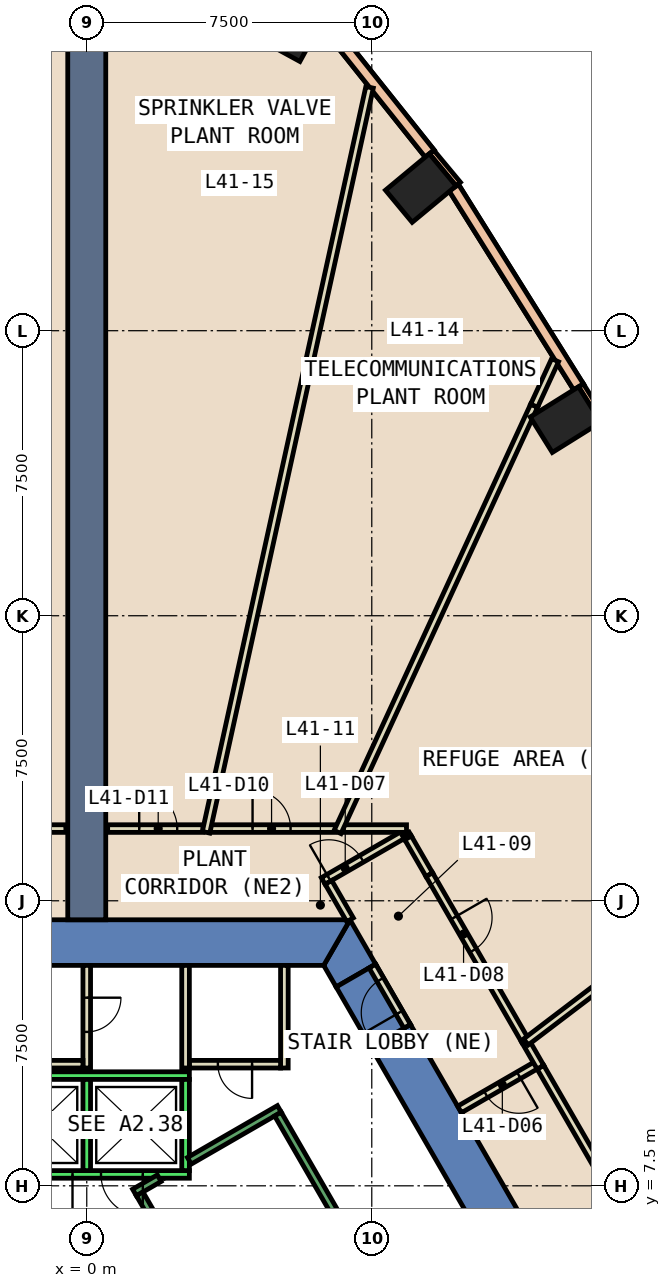
"""IFC4 building model, lengths in metres.
Left out: names, types, materials, properties, quantities, classifications, styles, units other than length and angle.
Written with IfcOpenShell. Run it as: python <this file> out.ifc"""

import sys

from ifc_helpers import new_model, si_unit, direction, frame, frame_2d, origin, origin_2d, place, context, subcontext, project, spatial, polyline, rectangle, outline, extrude, element, fill, save


model = new_model("IFC4")
c1 = context("Model", 3, precision=1e-05, world=origin(), true_north=direction((0.0, 1.0)))
c2 = subcontext(c1, "Body", "Model", "MODEL_VIEW")
j1 = project(units=[si_unit("LENGTHUNIT", "METRE"), si_unit("PLANEANGLEUNIT", "RADIAN")], contexts=[c1])
p1 = place(None, origin())
s1 = spatial("IfcSite", under=j1, at=p1, CompositionType="ELEMENT")
p2 = place(p1, origin())
s2 = spatial("IfcBuilding", under=s1, at=p2, CompositionType="ELEMENT")
p3 = place(p2, frame((0.0, 0.0, 184.4)))
s3 = spatial("IfcBuildingStorey", under=s2, at=p3, CompositionType="ELEMENT", Elevation=184.4)
for number, where, z_axis, x_axis in (
    (1, (12.596, 27.66, -0.6), (0.0, 0.0, 1.0), (-0.53, 0.848, 0.0)),
    (2, (8.789, 33.754, -0.6), (0.0, 0.0, 1.0), (-0.639, 0.769, 0.0)),
    (3, (5.485, 38.006, -0.6), (0.0, 0.0, 1.0), (-0.878, 0.479, 0.0)),
):
    element("IfcColumn", number, at=place(p3, frame(where, z_axis=z_axis, x_axis=x_axis)), inside=s3, PredefinedType="COLUMN", context=c2, shape_type="SweptSolid", body=[
        extrude(rectangle(XDim=1.1, YDim=1.5, at=origin_2d()), origin(), (0.0, 0.0, 1.0), 5.4),
    ])
p4 = place(p3, frame((0.0, 0.0, -0.6)))
e4 = element("IfcWall", 4, at=p4, inside=s3, PredefinedType="SHEAR", context=c2, shape_type="SweptSolid", body=[
    extrude(outline(polyline([(8.517, 11.747), (7.478, 11.147), (12.471, 2.5), (13.856, 2.5), (8.517, 11.747)])), origin(), (0.0, 0.0, 1.0), 5.4),
])
p5 = place(p3, frame((0.0, 0.0, -0.6)))
e5 = element("IfcWall", 5, at=p5, inside=s3, PredefinedType="SHEAR", context=c2, shape_type="SweptSolid", body=[
    extrude(outline(polyline([(6.563, 12.732), (7.602, 13.332), (6.928, 14.5), (6.235, 13.3), (6.563, 12.732)])), origin(), (0.0, 0.0, 1.0), 5.4),
])
p6 = place(p3, frame((0.0, 0.0, 3.6)))
e6 = element("IfcWall", 6, at=p6, inside=s3, PredefinedType="SHEAR", context=c2, shape_type="SweptSolid", body=[
    extrude(outline(polyline([(7.602, 13.332), (6.563, 12.732), (7.478, 11.147), (8.517, 11.747), (7.602, 13.332)])), origin(), (0.0, 0.0, 1.0), 1.2),
])
p7 = place(p3, frame((0.0, 0.0, -0.6)))
e7 = element("IfcWall", 7, at=p7, inside=s3, PredefinedType="SHEAR", context=c2, shape_type="SweptSolid", body=[
    extrude(outline(polyline([(6.928, 14.5), (-6.928, 14.5), (-6.235, 13.3), (6.235, 13.3), (6.928, 14.5)])), origin(), (0.0, 0.0, 1.0), 5.4),
])
p8 = place(p3, frame((0.0, 14.5, 0.0), z_axis=(0.0, 0.0, 1.0), x_axis=(0.0, 1.0, 0.0)))
e8 = element("IfcWall", 8, at=p8, inside=s3, PredefinedType="SHEAR", context=c2, shape_type="SweptSolid", body=[
    extrude(rectangle(XDim=23.389, YDim=1.0, at=frame_2d((11.694, 0.0))), origin(), (0.0, 0.0, 1.0), 4.8),
])
for number, where, z_axis, x_axis in (
    (9, (13.587, 27.631, 0.0), (0.0, 0.0, 1.0), (-0.53, 0.848, 0.0)),
    (10, (9.775, 33.858, 0.0), (0.0, 0.0, 1.0), (-0.639, 0.769, 0.0)),
):
    element("IfcWall", number, at=place(p3, frame(where, z_axis=z_axis, x_axis=x_axis)), inside=s3, PredefinedType="STANDARD", context=c2, shape_type="SweptSolid", body=[
        extrude(rectangle(XDim=1.1, YDim=0.15, at=frame_2d((0.55, 0.0))), origin(), (0.0, 0.0, 1.0), 4.8),
    ])
p9 = place(p3, frame((12.94, 28.523, 0.0), z_axis=(0.0, 0.0, 1.0), x_axis=(-0.530698032758, 0.847560970094, 0.0)))
e11 = element("IfcWall", 11, at=p9, inside=s3, PredefinedType="STANDARD", context=c2, shape_type="SweptSolid", body=[
    extrude(rectangle(XDim=6.182, YDim=0.3, at=frame_2d((3.091, 0.0))), origin(), (0.0, 0.0, 1.0), 1.2),
])
p10 = place(p3, frame((12.94, 28.523, 4.0), z_axis=(0.0, 0.0, 1.0), x_axis=(-0.530698032758, 0.847560970094, 0.0)))
e12 = element("IfcWall", 12, at=p10, inside=s3, PredefinedType="STANDARD", context=c2, shape_type="SweptSolid", body=[
    extrude(rectangle(XDim=6.182, YDim=0.3, at=frame_2d((3.091, 0.0))), origin(), (0.0, 0.0, 1.0), 0.8),
])
p11 = place(p3, frame((9.023, 34.662, 0.0), z_axis=(0.0, 0.0, 1.0), x_axis=(-0.623651555058, 0.781702461218, 0.0)))
e13 = element("IfcWall", 13, at=p11, inside=s3, PredefinedType="STANDARD", context=c2, shape_type="SweptSolid", body=[
    extrude(rectangle(XDim=4.51, YDim=0.3, at=frame_2d((2.255, 0.0))), origin(), (0.0, 0.0, 1.0), 1.2),
])
p12 = place(p3, frame((9.023, 34.662, 4.0), z_axis=(0.0, 0.0, 1.0), x_axis=(-0.623651555058, 0.781702461218, 0.0)))
e14 = element("IfcWall", 14, at=p12, inside=s3, PredefinedType="STANDARD", context=c2, shape_type="SweptSolid", body=[
    extrude(rectangle(XDim=4.51, YDim=0.3, at=frame_2d((2.255, 0.0))), origin(), (0.0, 0.0, 1.0), 0.8),
])
p13 = place(p3, frame((5.2, 13.3, 0.0), z_axis=(0.0, 0.0, 1.0), x_axis=(0.0, -1.0, 0.0)))
e15 = element("IfcWall", 15, at=p13, inside=s3, PredefinedType="PARTITIONING", context=c2, shape_type="SweptSolid", body=[
    extrude(rectangle(XDim=2.7, YDim=0.2, at=frame_2d((1.35, 0.0))), origin(), (0.0, 0.0, 1.0), 4.8),
])
p14 = place(p3, frame((5.1, 10.7, 0.0), z_axis=(0.0, 0.0, 1.0), x_axis=(-1.0, 0.0, 0.0)))
e16 = element("IfcWall", 16, at=p14, inside=s3, PredefinedType="PARTITIONING", context=c2, shape_type="SweptSolid", body=[
    extrude(rectangle(XDim=2.4, YDim=0.2, at=frame_2d((1.2, 0.0))), origin(), (0.0, 0.0, 1.0), 4.8),
])
p15 = place(p14, frame((0.75, 0.0, 0.0)))
e17 = element("IfcOpeningElement", 17, at=p15, cuts=e16, PredefinedType="OPENING", context=c2, shape_type="SweptSolid", body=[
    extrude(rectangle(XDim=0.9, YDim=2.1, at=frame_2d((0.45, 1.05))), frame((0.0, 0.11, 0.0), z_axis=(0.0, -1.0, 0.0), x_axis=(1.0, 0.0, 0.0)), (0.0, 0.0, 1.0), 0.22),
])
p16 = place(p3, frame((2.6, 10.6, 0.0), z_axis=(0.0, 0.0, 1.0), x_axis=(0.0, 1.0, 0.0)))
e18 = element("IfcWall", 18, at=p16, inside=s3, PredefinedType="PARTITIONING", context=c2, shape_type="SweptSolid", body=[
    extrude(rectangle(XDim=2.7, YDim=0.2, at=frame_2d((1.35, 0.0))), origin(), (0.0, 0.0, 1.0), 4.8),
])
p17 = place(p3, frame((0.0, 13.3, 0.0), z_axis=(0.0, 0.0, 1.0), x_axis=(0.0, -1.0, 0.0)))
e19 = element("IfcWall", 19, at=p17, inside=s3, PredefinedType="PARTITIONING", context=c2, shape_type="SweptSolid", body=[
    extrude(rectangle(XDim=2.7, YDim=0.2, at=frame_2d((1.35, 0.0))), origin(), (0.0, 0.0, 1.0), 4.8),
])
p18 = place(p17, frame((0.85, 0.0, 0.0)))
e20 = element("IfcOpeningElement", 20, at=p18, cuts=e19, PredefinedType="OPENING", context=c2, shape_type="SweptSolid", body=[
    extrude(rectangle(XDim=0.9, YDim=2.1, at=frame_2d((0.45, 1.05))), frame((0.0, 0.11, 0.0), z_axis=(0.0, -1.0, 0.0), x_axis=(1.0, 0.0, 0.0)), (0.0, 0.0, 1.0), 0.22),
])
p19 = place(p3, frame((-0.1, 10.7, 0.0), z_axis=(0.0, 0.0, 1.0), x_axis=(-1.0, 0.0, 0.0)))
e21 = element("IfcWall", 21, at=p19, inside=s3, PredefinedType="PARTITIONING", context=c2, shape_type="SweptSolid", body=[
    extrude(rectangle(XDim=2.4, YDim=0.2, at=frame_2d((1.2, 0.0))), origin(), (0.0, 0.0, 1.0), 4.8),
])
p20 = place(p3, frame((11.888, 10.709, 0.0), z_axis=(0.0, 0.0, 1.0), x_axis=(-0.865973769406, -0.500089422704, 0.0)))
e22 = element("IfcWall", 22, at=p20, inside=s3, PredefinedType="PARTITIONING", context=c2, shape_type="SweptSolid", body=[
    extrude(rectangle(XDim=2.399, YDim=0.2, at=frame_2d((1.2, 0.0))), origin(), (0.0, 0.0, 1.0), 2.4),
])
p21 = place(p20, frame((0.6, 0.0, 0.0)))
e23 = element("IfcOpeningElement", 23, at=p21, cuts=e22, PredefinedType="OPENING", context=c2, shape_type="SweptSolid", body=[
    extrude(rectangle(XDim=1.0, YDim=2.1, at=frame_2d((0.5, 1.05))), frame((0.0, 0.11, 0.0), z_axis=(0.0, -1.0, 0.0), x_axis=(1.0, 0.0, 0.0)), (0.0, 0.0, 1.0), 0.22),
])
p22 = place(p3, frame((6.223, 15.521, 0.0), z_axis=(0.0, 0.0, 1.0), x_axis=(0.866022959057, 0.500004234368, 0.0)))
e24 = element("IfcWall", 24, at=p22, inside=s3, PredefinedType="PARTITIONING", context=c2, shape_type="SweptSolid", body=[
    extrude(rectangle(XDim=2.5, YDim=0.2, at=frame_2d((1.25, 0.0))), origin(), (0.0, 0.0, 1.0), 4.8),
])
p23 = place(p22, frame((0.168, 0.0, 0.0)))
e25 = element("IfcOpeningElement", 25, at=p23, cuts=e24, PredefinedType="OPENING", context=c2, shape_type="SweptSolid", body=[
    extrude(rectangle(XDim=1.0, YDim=2.1, at=frame_2d((0.5, 1.05))), frame((0.0, 0.11, 0.0), z_axis=(0.0, -1.0, 0.0), x_axis=(1.0, 0.0, 0.0)), (0.0, 0.0, 1.0), 0.22),
])
p24 = place(p3, frame((6.36, 15.484, 0.0), z_axis=(0.0, 0.0, 1.0), x_axis=(0.499883687939, -0.866092546171, 0.0)))
e26 = element("IfcWall", 26, at=p24, inside=s3, PredefinedType="PARTITIONING", context=c2, shape_type="SweptSolid", body=[
    extrude(rectangle(XDim=1.136, YDim=0.2, at=frame_2d((0.568, 0.0))), origin(), (0.0, 0.0, 1.0), 4.8),
])
p25 = place(p3, frame((8.398, 16.754, 0.0), z_axis=(0.0, 0.0, 1.0), x_axis=(0.500277597875, -0.865865073245, 0.0)))
e27 = element("IfcWall", 27, at=p25, inside=s3, PredefinedType="PARTITIONING", context=c2, shape_type="SweptSolid", body=[
    extrude(rectangle(XDim=0.114, YDim=0.2, at=frame_2d((0.057, 0.0))), origin(), (0.0, 0.0, 1.0), 4.8),
])
p26 = place(p3, frame((11.938, 10.622, 0.0), z_axis=(0.0, 0.0, 1.0), x_axis=(0.500069357699, -0.865985356395, 0.0)))
e28 = element("IfcWall", 28, at=p26, inside=s3, PredefinedType="PARTITIONING", context=c2, shape_type="SweptSolid", body=[
    extrude(rectangle(XDim=5.137, YDim=0.2, at=frame_2d((2.569, 0.0))), origin(), (0.0, 0.0, 1.0), 2.4),
])
p27 = place(p3, frame((6.741, 16.9, 0.0), z_axis=(0.0, 0.0, 1.0), x_axis=(1.0, 0.0, 0.0)))
e29 = element("IfcWall", 29, at=p27, inside=s3, PredefinedType="PARTITIONING", context=c2, shape_type="SweptSolid", body=[
    extrude(rectangle(XDim=1.673, YDim=0.2, at=frame_2d((0.836, 0.0))), origin(), (0.0, 0.0, 1.0), 4.8),
])
p28 = place(p3, frame((3.26, 16.9, 0.0), z_axis=(0.0, 0.0, 1.0), x_axis=(1.0, 0.0, 0.0)))
e30 = element("IfcWall", 30, at=p28, inside=s3, PredefinedType="PARTITIONING", context=c2, shape_type="SweptSolid", body=[
    extrude(rectangle(XDim=3.281, YDim=0.2, at=frame_2d((1.641, 0.0))), origin(), (0.0, 0.0, 1.0), 4.8),
])
p29 = place(p28, frame((1.103, 0.0, 0.0)))
e31 = element("IfcOpeningElement", 31, at=p29, cuts=e30, PredefinedType="OPENING", context=c2, shape_type="SweptSolid", body=[
    extrude(rectangle(XDim=1.0, YDim=2.1, at=frame_2d((0.5, 1.05))), frame((0.0, 0.11, 0.0), z_axis=(0.0, -1.0, 0.0), x_axis=(1.0, 0.0, 0.0)), (0.0, 0.0, 1.0), 0.22),
])
p30 = place(p3, frame((0.55, 16.9, 0.0), z_axis=(0.0, 0.0, 1.0), x_axis=(1.0, 0.0, 0.0)))
e32 = element("IfcWall", 32, at=p30, inside=s3, PredefinedType="PARTITIONING", context=c2, shape_type="SweptSolid", body=[
    extrude(rectangle(XDim=2.51, YDim=0.2, at=frame_2d((1.255, 0.0))), origin(), (0.0, 0.0, 1.0), 4.8),
])
p31 = place(p30, frame((0.83, 0.0, 0.0)))
e33 = element("IfcOpeningElement", 33, at=p31, cuts=e32, PredefinedType="OPENING", context=c2, shape_type="SweptSolid", body=[
    extrude(rectangle(XDim=1.0, YDim=2.1, at=frame_2d((0.5, 1.05))), frame((0.0, 0.11, 0.0), z_axis=(0.0, -1.0, 0.0), x_axis=(1.0, 0.0, 0.0)), (0.0, 0.0, 1.0), 0.22),
])
p32 = place(p3, frame((6.599, 16.809, 0.0), z_axis=(0.0, 0.0, 1.0), x_axis=(0.418744831877, 0.908103939963, 0.0)))
e34 = element("IfcWall", 34, at=p32, inside=s3, PredefinedType="PARTITIONING", context=c2, shape_type="SweptSolid", body=[
    extrude(rectangle(XDim=12.353, YDim=0.2, at=frame_2d((6.177, 0.0))), origin(), (0.0, 0.0, 1.0), 4.8),
])
p33 = place(p3, frame((3.139, 16.802, 0.0), z_axis=(0.0, 0.0, 1.0), x_axis=(0.214411540921, 0.976743411096, 0.0)))
e35 = element("IfcWall", 35, at=p33, inside=s3, PredefinedType="PARTITIONING", context=c2, shape_type="SweptSolid", body=[
    extrude(rectangle(XDim=20.069, YDim=0.2, at=frame_2d((10.034, 0.0))), origin(), (0.0, 0.0, 1.0), 4.8),
])
p34 = place(p3, frame((8.431, 11.698, 0.0), z_axis=(0.0, 0.0, 1.0), x_axis=(-0.500115259676, 0.865958848352, 0.0)))
e36 = element("IfcWall", 36, at=p34, inside=s3, PredefinedType="PARTITIONING", context=c2, shape_type="SweptSolid", body=[
    extrude(rectangle(XDim=1.829, YDim=0.2, at=frame_2d((0.915, 0.0))), origin(), (0.0, 0.0, 1.0), 2.4),
])
p35 = place(p34, frame((0.415, 0.0, 0.0)))
e37 = element("IfcOpeningElement", 37, at=p35, cuts=e36, PredefinedType="OPENING", context=c2, shape_type="SweptSolid", body=[
    extrude(rectangle(XDim=1.0, YDim=2.1, at=frame_2d((0.5, 1.05))), frame((0.0, 0.11, 0.0), z_axis=(0.0, -1.0, 0.0), x_axis=(1.0, 0.0, 0.0)), (0.0, 0.0, 1.0), 0.22),
])
p36 = place(p3, frame((8.455, 16.655, 0.0), z_axis=(0.0, 0.0, 1.0), x_axis=(0.499968249168, -0.86604373436, 0.0)))
e38 = element("IfcWall", 38, at=p36, inside=s3, PredefinedType="PARTITIONING", context=c2, shape_type="SweptSolid", body=[
    extrude(rectangle(XDim=1.118, YDim=0.2, at=frame_2d((0.559, 0.0))), origin(), (0.0, 0.0, 1.0), 2.4),
])
p37 = place(p3, frame((9.014, 15.687, 0.0), z_axis=(0.0, 0.0, 1.0), x_axis=(0.499967322677, -0.866044269224, 0.0)))
e39 = element("IfcWall", 39, at=p37, inside=s3, PredefinedType="PARTITIONING", context=c2, shape_type="SweptSolid", body=[
    extrude(rectangle(XDim=5.034, YDim=0.2, at=frame_2d((2.517, 0.0))), origin(), (0.0, 0.0, 1.0), 4.8),
])
p38 = place(p37, frame((1.303, 0.0, 0.0)))
e40 = element("IfcOpeningElement", 40, at=p38, cuts=e39, PredefinedType="OPENING", context=c2, shape_type="SweptSolid", body=[
    extrude(rectangle(XDim=1.0, YDim=2.1, at=frame_2d((0.5, 1.05))), frame((0.0, 0.11, 0.0), z_axis=(0.0, -1.0, 0.0), x_axis=(1.0, 0.0, 0.0)), (0.0, 0.0, 1.0), 0.22),
])
p39 = place(p3, frame((11.531, 11.327, 0.0), z_axis=(0.0, 0.0, 1.0), x_axis=(0.500042693391, -0.866000753341, 0.0)))
e41 = element("IfcWall", 41, at=p39, inside=s3, PredefinedType="PARTITIONING", context=c2, shape_type="SweptSolid", body=[
    extrude(rectangle(XDim=0.814, YDim=0.2, at=frame_2d((0.407, 0.0))), origin(), (0.0, 0.0, 1.0), 2.4),
])
p40 = place(p3, frame((15.455, 14.249, 0.0), z_axis=(0.0, 0.0, 1.0), x_axis=(-0.796089188828, -0.605179315106, 0.0)))
e42 = element("IfcWall", 42, at=p40, inside=s3, PredefinedType="PARTITIONING", context=c2, shape_type="SweptSolid", body=[
    extrude(rectangle(XDim=4.898, YDim=0.2, at=frame_2d((2.449, 0.0))), origin(), (0.0, 0.0, 1.0), 2.4),
])
p41 = place(p3, frame((11.772, 28.027, 0.0), z_axis=(0.0, 0.0, 1.0), x_axis=(0.418764526631, 0.90809485806, 0.0)))
e43 = element("IfcWall", 43, at=p41, inside=s3, PredefinedType="PARTITIONING", context=c2, shape_type="SweptSolid", body=[
    extrude(rectangle(XDim=1.318, YDim=0.2, at=frame_2d((0.659, 0.0))), origin(), (0.0, 0.0, 1.0), 2.4),
])
p42 = place(p3, frame((-1.682, 16.9, 0.0), z_axis=(0.0, 0.0, 1.0), x_axis=(1.0, 0.0, 0.0)))
e44 = element("IfcWall", 44, at=p42, inside=s3, PredefinedType="PARTITIONING", context=c2, shape_type="SweptSolid", body=[
    extrude(rectangle(XDim=1.132, YDim=0.2, at=frame_2d((0.566, 0.0))), origin(), (0.0, 0.0, 1.0), 4.8),
])
p43 = place(p3, frame((2.7, 7.8, 0.0), z_axis=(0.0, 0.0, 1.0), x_axis=(-1.0, 0.0, 0.0)))
e45 = element("IfcWall", 45, at=p43, inside=s3, PredefinedType="STANDARD", context=c2, shape_type="SweptSolid", body=[
    extrude(rectangle(XDim=5.4, YDim=0.2, at=frame_2d((2.7, 0.0))), origin(), (0.0, 0.0, 1.0), 4.8),
])
p44 = place(p43, frame((1.225, 0.0, 0.0)))
e46 = element("IfcOpeningElement", 46, at=p44, cuts=e45, PredefinedType="OPENING", context=c2, shape_type="SweptSolid", body=[
    extrude(rectangle(XDim=1.1, YDim=2.1, at=frame_2d((0.55, 1.05))), frame((0.0, 0.11, 0.0), z_axis=(0.0, -1.0, 0.0), x_axis=(1.0, 0.0, 0.0)), (0.0, 0.0, 1.0), 0.22),
])
p45 = place(p43, frame((3.075, 0.0, 0.0)))
e47 = element("IfcOpeningElement", 47, at=p45, cuts=e45, PredefinedType="OPENING", context=c2, shape_type="SweptSolid", body=[
    extrude(rectangle(XDim=1.1, YDim=2.1, at=frame_2d((0.55, 1.05))), frame((0.0, 0.11, 0.0), z_axis=(0.0, -1.0, 0.0), x_axis=(1.0, 0.0, 0.0)), (0.0, 0.0, 1.0), 0.22),
])
p46 = place(p3, frame((2.7, 10.4, 0.0), z_axis=(0.0, 0.0, 1.0), x_axis=(-1.0, 0.0, 0.0)))
e48 = element("IfcWall", 48, at=p46, inside=s3, PredefinedType="STANDARD", context=c2, shape_type="SweptSolid", body=[
    extrude(rectangle(XDim=5.4, YDim=0.2, at=frame_2d((2.7, 0.0))), origin(), (0.0, 0.0, 1.0), 4.8),
])
for number, where, z_axis, x_axis in (
    (49, (2.6, 7.9, 0.0), (0.0, 0.0, 1.0), (0.0, 1.0, 0.0)),
    (50, (0.0, 7.9, 0.0), (0.0, 0.0, 1.0), (0.0, 1.0, 0.0)),
):
    element("IfcWall", number, at=place(p3, frame(where, z_axis=z_axis, x_axis=x_axis)), inside=s3, PredefinedType="STANDARD", context=c2, shape_type="SweptSolid", body=[
        extrude(rectangle(XDim=2.4, YDim=0.2, at=frame_2d((1.2, 0.0))), origin(), (0.0, 0.0, 1.0), 4.8),
    ])
p47 = place(p3, frame((2.7, 8.158, 0.0), z_axis=(0.0, 0.0, 1.0), x_axis=(0.86611865017, 0.499838457731, 0.0)))
e51 = element("IfcWall", 51, at=p47, inside=s3, PredefinedType="STANDARD", context=c2, shape_type="SweptSolid", body=[
    extrude(rectangle(XDim=2.733, YDim=0.2, at=frame_2d((1.366, 0.0))), origin(), (0.0, 0.0, 1.0), 4.8),
])
p48 = place(p3, frame((1.256, 7.324, 0.0), z_axis=(0.0, 0.0, 1.0), x_axis=(0.865915093549, 0.500191014278, 0.0)))
e52 = element("IfcWall", 52, at=p48, inside=s3, PredefinedType="STANDARD", context=c2, shape_type="SweptSolid", body=[
    extrude(rectangle(XDim=0.752, YDim=0.2, at=frame_2d((0.376, 0.0))), origin(), (0.0, 0.0, 1.0), 4.8),
])
p49 = place(p3, frame((4.843, 1.312, 0.0), z_axis=(0.0, 0.0, 1.0), x_axis=(-0.499963383562, 0.866046543262, 0.0)))
e53 = element("IfcWall", 53, at=p49, inside=s3, PredefinedType="STANDARD", context=c2, shape_type="SweptSolid", body=[
    extrude(rectangle(XDim=6.9, YDim=0.2, at=frame_2d((3.45, 0.0))), origin(), (0.0, 0.0, 1.0), 4.8),
])
p50 = place(p49, frame((0.45, 0.0, 0.0)))
e54 = element("IfcOpeningElement", 54, at=p50, cuts=e53, PredefinedType="OPENING", context=c2, shape_type="SweptSolid", body=[
    extrude(rectangle(XDim=1.1, YDim=2.2, at=frame_2d((0.55, 1.1))), frame((0.0, 0.11, 0.0), z_axis=(0.0, -1.0, 0.0), x_axis=(1.0, 0.0, 0.0)), (0.0, 0.0, 1.0), 0.22),
])
p51 = place(p3, frame((8.48, 3.412, 0.0), z_axis=(0.0, 0.0, 1.0), x_axis=(-0.499978703459, 0.866037698999, 0.0)))
e55 = element("IfcWall", 55, at=p51, inside=s3, PredefinedType="STANDARD", context=c2, shape_type="SweptSolid", body=[
    extrude(rectangle(XDim=6.9, YDim=0.2, at=frame_2d((3.45, 0.0))), origin(), (0.0, 0.0, 1.0), 4.8),
])
p52 = place(p21, origin())
e56 = element("IfcDoor", 56, at=p52, inside=s3, OperationType="SINGLE_SWING_RIGHT", PredefinedType="DOOR", context=c2, shape_type="SweptSolid", body=[
    extrude(rectangle(XDim=1.0, YDim=2.1, at=frame_2d((0.5, 1.05))), frame((0.0, 0.025, 0.0), z_axis=(0.0, -1.0, 0.0), x_axis=(1.0, 0.0, 0.0)), (0.0, 0.0, 1.0), 0.05),
])
fill(e23, e56)
p53 = place(p23, origin())
e57 = element("IfcDoor", 57, at=p53, inside=s3, OperationType="SINGLE_SWING_LEFT", PredefinedType="DOOR", context=c2, shape_type="SweptSolid", body=[
    extrude(rectangle(XDim=1.0, YDim=2.1, at=frame_2d((0.5, 1.05))), frame((0.0, 0.025, 0.0), z_axis=(0.0, -1.0, 0.0), x_axis=(1.0, 0.0, 0.0)), (0.0, 0.0, 1.0), 0.05),
])
fill(e25, e57)
p54 = place(p38, origin())
e58 = element("IfcDoor", 58, at=p54, inside=s3, OperationType="SINGLE_SWING_RIGHT", PredefinedType="DOOR", context=c2, shape_type="SweptSolid", body=[
    extrude(rectangle(XDim=1.0, YDim=2.1, at=frame_2d((0.5, 1.05))), frame((0.0, 0.025, 0.0), z_axis=(0.0, -1.0, 0.0), x_axis=(1.0, 0.0, 0.0)), (0.0, 0.0, 1.0), 0.05),
])
fill(e40, e58)
p55 = place(p29, origin())
e59 = element("IfcDoor", 59, at=p55, inside=s3, OperationType="SINGLE_SWING_RIGHT", PredefinedType="DOOR", context=c2, shape_type="SweptSolid", body=[
    extrude(rectangle(XDim=1.0, YDim=2.1, at=frame_2d((0.5, 1.05))), frame((0.0, 0.025, 0.0), z_axis=(0.0, -1.0, 0.0), x_axis=(1.0, 0.0, 0.0)), (0.0, 0.0, 1.0), 0.05),
])
fill(e31, e59)
p56 = place(p31, origin())
e60 = element("IfcDoor", 60, at=p56, inside=s3, OperationType="SINGLE_SWING_LEFT", PredefinedType="DOOR", context=c2, shape_type="SweptSolid", body=[
    extrude(rectangle(XDim=1.0, YDim=2.1, at=frame_2d((0.5, 1.05))), frame((0.0, 0.025, 0.0), z_axis=(0.0, -1.0, 0.0), x_axis=(1.0, 0.0, 0.0)), (0.0, 0.0, 1.0), 0.05),
])
fill(e33, e60)
p57 = place(p15, origin())
e61 = element("IfcDoor", 61, at=p57, inside=s3, OperationType="SINGLE_SWING_RIGHT", PredefinedType="DOOR", context=c2, shape_type="SweptSolid", body=[
    extrude(rectangle(XDim=0.9, YDim=2.1, at=frame_2d((0.45, 1.05))), frame((0.0, 0.025, 0.0), z_axis=(0.0, -1.0, 0.0), x_axis=(1.0, 0.0, 0.0)), (0.0, 0.0, 1.0), 0.05),
])
fill(e17, e61)
p58 = place(p18, origin())
e62 = element("IfcDoor", 62, at=p58, inside=s3, OperationType="SINGLE_SWING_RIGHT", PredefinedType="DOOR", context=c2, shape_type="SweptSolid", body=[
    extrude(rectangle(XDim=0.9, YDim=2.1, at=frame_2d((0.45, 1.05))), frame((0.0, 0.025, 0.0), z_axis=(0.0, -1.0, 0.0), x_axis=(1.0, 0.0, 0.0)), (0.0, 0.0, 1.0), 0.05),
])
fill(e20, e62)
p59 = place(p35, origin())
e63 = element("IfcDoor", 63, at=p59, inside=s3, OperationType="SINGLE_SWING_LEFT", PredefinedType="DOOR", context=c2, shape_type="SweptSolid", body=[
    extrude(rectangle(XDim=1.0, YDim=2.1, at=frame_2d((0.5, 1.05))), frame((0.0, 0.025, 0.0), z_axis=(0.0, -1.0, 0.0), x_axis=(1.0, 0.0, 0.0)), (0.0, 0.0, 1.0), 0.05),
])
fill(e37, e63)
p60 = place(p44, origin())
e64 = element("IfcDoor", 64, at=p60, inside=s3, OperationType="SLIDING_TO_LEFT", PredefinedType="DOOR", context=c2, shape_type="SweptSolid", body=[
    extrude(rectangle(XDim=1.1, YDim=2.1, at=frame_2d((0.55, 1.05))), frame((0.0, 0.025, 0.0), z_axis=(0.0, -1.0, 0.0), x_axis=(1.0, 0.0, 0.0)), (0.0, 0.0, 1.0), 0.05),
])
fill(e46, e64)
p61 = place(p45, origin())
e65 = element("IfcDoor", 65, at=p61, inside=s3, OperationType="SLIDING_TO_LEFT", PredefinedType="DOOR", context=c2, shape_type="SweptSolid", body=[
    extrude(rectangle(XDim=1.1, YDim=2.1, at=frame_2d((0.55, 1.05))), frame((0.0, 0.025, 0.0), z_axis=(0.0, -1.0, 0.0), x_axis=(1.0, 0.0, 0.0)), (0.0, 0.0, 1.0), 0.05),
])
fill(e47, e65)
save(model, sys.argv[1])
